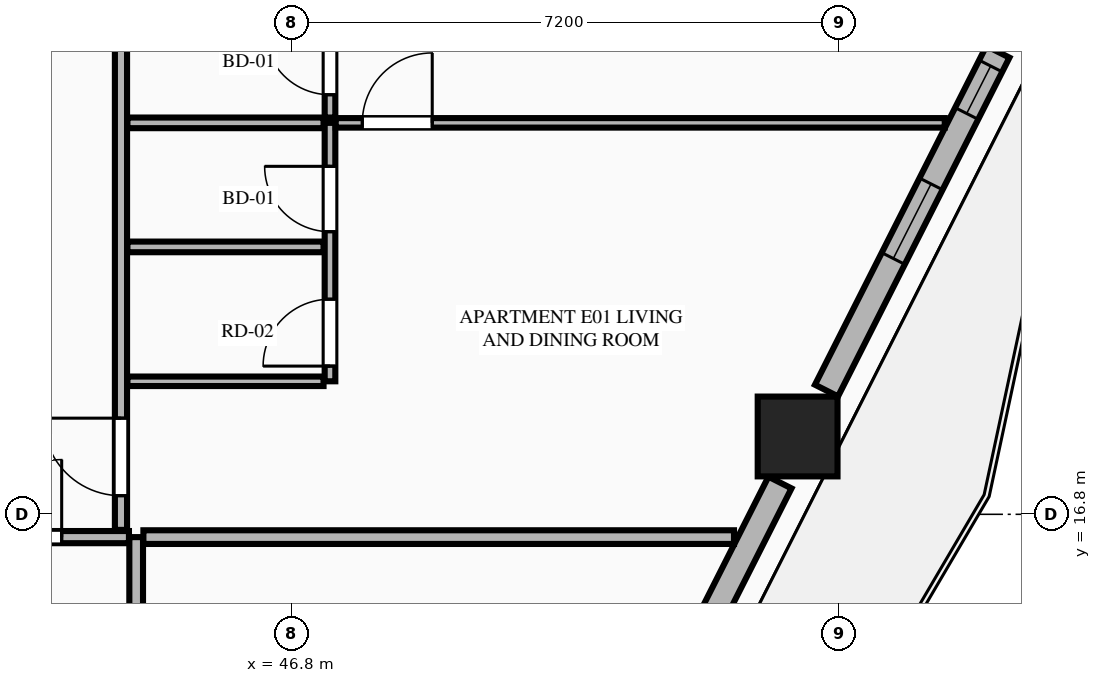
"""IFC4 building model, lengths in metres.
Left out: names, types, materials, properties, quantities, classifications, styles, units other than length and angle.
Written with IfcOpenShell. Run it as: python <this file> out.ifc"""

import sys

from ifc_helpers import new_model, si_unit, direction, frame, frame_2d, origin, origin_2d, place, context, subcontext, project, spatial, rectangle, extrude, element, fill, save


model = new_model("IFC4")
c1 = context("Model", 3, precision=1e-05, world=origin(), true_north=direction((0.0, 1.0)))
c2 = subcontext(c1, "Body", "Model", "MODEL_VIEW")
j1 = project(units=[si_unit("LENGTHUNIT", "METRE"), si_unit("PLANEANGLEUNIT", "RADIAN")], contexts=[c1])
p1 = place(None, origin())
s1 = spatial("IfcSite", under=j1, at=p1, CompositionType="ELEMENT")
p2 = place(p1, origin())
s2 = spatial("IfcBuilding", under=s1, at=p2, CompositionType="ELEMENT")
p3 = place(p2, frame((0.0, 0.0, 137.45)))
s3 = spatial("IfcBuildingStorey", under=s2, at=p3, CompositionType="ELEMENT", Elevation=137.45)
p4 = place(p3, frame((53.452, 17.824, 0.0), z_axis=(0.0, 0.0, 1.0), x_axis=(1.0, 0.0, 0.0)))
e1 = element("IfcColumn", 1, at=p4, inside=s3, PredefinedType="COLUMN", context=c2, shape_type="SweptSolid", body=[
    extrude(rectangle(XDim=1.05, YDim=1.05, at=origin_2d()), origin(), (0.0, 0.0, 1.0), 3.55),
])
p5 = place(p3, frame((50.863, 12.561, 0.0), z_axis=(0.0, 0.0, 1.0), x_axis=(0.451567731634, 0.892236842855, 0.0)))
e2 = element("IfcWall", 2, at=p5, inside=s3, PredefinedType="STANDARD", context=c2, shape_type="SweptSolid", body=[
    extrude(rectangle(XDim=5.219, YDim=0.34, at=frame_2d((2.61, 0.0))), origin(), (0.0, 0.0, 1.0), 2.797),
])
p6 = place(p5, frame((1.532, 0.0, 0.0)))
e3 = element("IfcOpeningElement", 3, at=p6, cuts=e2, PredefinedType="OPENING", context=c2, shape_type="SweptSolid", body=[
    extrude(rectangle(XDim=1.1, YDim=2.25, at=frame_2d((0.55, 1.125))), frame((0.0, 0.18, 0.0), z_axis=(0.0, -1.0, 0.0), x_axis=(1.0, 0.0, 0.0)), (0.0, 0.0, 1.0), 0.36),
])
p7 = place(p3, frame((53.832, 18.428, 0.0), z_axis=(0.0, 0.0, 1.0), x_axis=(0.451431617681, 0.892305718102, 0.0)))
e4 = element("IfcWall", 4, at=p7, inside=s3, PredefinedType="STANDARD", context=c2, shape_type="SweptSolid", body=[
    extrude(rectangle(XDim=4.995, YDim=0.34, at=frame_2d((2.498, 0.0))), origin(), (0.0, 0.0, 1.0), 2.797),
])
p8 = place(p7, frame((1.947, 0.0, 0.75)))
e5 = element("IfcOpeningElement", 5, at=p8, cuts=e4, PredefinedType="OPENING", context=c2, shape_type="SweptSolid", body=[
    extrude(rectangle(XDim=1.1, YDim=1.897, at=frame_2d((0.55, 0.948))), frame((0.0, 0.18, 0.0), z_axis=(0.0, -1.0, 0.0), x_axis=(1.0, 0.0, 0.0)), (0.0, 0.0, 1.0), 0.36),
])
p9 = place(p7, frame((4.085, 0.0, 0.75)))
e6 = element("IfcOpeningElement", 6, at=p9, cuts=e4, PredefinedType="OPENING", context=c2, shape_type="SweptSolid", body=[
    extrude(rectangle(XDim=0.7, YDim=1.897, at=frame_2d((0.35, 0.948))), frame((0.0, 0.18, 0.0), z_axis=(0.0, -1.0, 0.0), x_axis=(1.0, 0.0, 0.0)), (0.0, 0.0, 1.0), 0.36),
])
p10 = place(p3, frame((44.75, 4.105, 0.0), z_axis=(0.0, 0.0, 1.0), x_axis=(0.0, 1.0, 0.0)))
e7 = element("IfcWall", 7, at=p10, inside=s3, PredefinedType="PARTITIONING", context=c2, shape_type="SweptSolid", body=[
    extrude(rectangle(XDim=12.395, YDim=0.18, at=frame_2d((6.198, 0.0))), origin(), (0.0, 0.0, 1.0), 3.34),
])
p11 = place(p3, frame((28.663, 16.5, 0.0), z_axis=(0.0, 0.0, 1.0), x_axis=(1.0, 0.0, 0.0)))
e8 = element("IfcWall", 8, at=p11, inside=s3, PredefinedType="PARTITIONING", context=c2, shape_type="SweptSolid", body=[
    extrude(rectangle(XDim=15.992, YDim=0.16, at=frame_2d((7.996, 0.0))), origin(), (0.0, 0.0, 1.0), 3.34),
])
p12 = place(p11, frame((14.087, 0.0, 0.0)))
e9 = element("IfcOpeningElement", 9, at=p12, cuts=e8, PredefinedType="OPENING", context=c2, shape_type="SweptSolid", body=[
    extrude(rectangle(XDim=1.02, YDim=2.25, at=frame_2d((0.51, 1.125))), frame((0.0, 0.09, 0.0), z_axis=(0.0, -1.0, 0.0), x_axis=(1.0, 0.0, 0.0)), (0.0, 0.0, 1.0), 0.18),
])
p13 = place(p3, frame((44.845, 16.5, 0.0), z_axis=(0.0, 0.0, 1.0), x_axis=(1.0, 0.0, 0.0)))
e10 = element("IfcWall", 10, at=p13, inside=s3, PredefinedType="PARTITIONING", context=c2, shape_type="SweptSolid", body=[
    extrude(rectangle(XDim=7.77, YDim=0.18, at=frame_2d((3.885, 0.0))), origin(), (0.0, 0.0, 1.0), 3.34),
])
p14 = place(p3, frame((44.55, 16.595, 0.0), z_axis=(0.0, 0.0, 1.0), x_axis=(0.0, 1.0, 0.0)))
e11 = element("IfcWall", 11, at=p14, inside=s3, PredefinedType="PARTITIONING", context=c2, shape_type="SweptSolid", body=[
    extrude(rectangle(XDim=9.21, YDim=0.16, at=frame_2d((4.605, 0.0))), origin(), (0.0, 0.0, 1.0), 3.34),
])
p15 = place(p14, frame((0.45, 0.0, 0.0)))
e12 = element("IfcOpeningElement", 12, at=p15, cuts=e11, PredefinedType="OPENING", context=c2, shape_type="SweptSolid", body=[
    extrude(rectangle(XDim=1.02, YDim=2.25, at=frame_2d((0.51, 1.125))), frame((0.0, 0.09, 0.0), z_axis=(0.0, -1.0, 0.0), x_axis=(1.0, 0.0, 0.0)), (0.0, 0.0, 1.0), 0.18),
])
p16 = place(p3, frame((44.635, 18.55, 0.0), z_axis=(0.0, 0.0, 1.0), x_axis=(1.0, 0.0, 0.0)))
e13 = element("IfcWall", 13, at=p16, inside=s3, PredefinedType="PARTITIONING", context=c2, shape_type="SweptSolid", body=[
    extrude(rectangle(XDim=2.58, YDim=0.125, at=frame_2d((1.29, 0.0))), origin(), (0.0, 0.0, 1.0), 2.722),
])
p17 = place(p3, frame((47.3, 18.55, 0.0), z_axis=(0.0, 0.0, 1.0), x_axis=(0.0, 1.0, 0.0)))
e14 = element("IfcWall", 14, at=p17, inside=s3, PredefinedType="PLUMBINGWALL", context=c2, shape_type="SweptSolid", body=[
    extrude(rectangle(XDim=3.4, YDim=0.14, at=frame_2d((1.7, 0.0))), origin(), (0.0, 0.0, 1.0), 3.34),
])
p18 = place(p17, frame((0.2, 0.0, 0.0)))
e15 = element("IfcOpeningElement", 15, at=p18, cuts=e14, PredefinedType="OPENING", context=c2, shape_type="SweptSolid", body=[
    extrude(rectangle(XDim=0.88, YDim=2.15, at=frame_2d((0.44, 1.075))), frame((0.0, 0.08, 0.0), z_axis=(0.0, -1.0, 0.0), x_axis=(1.0, 0.0, 0.0)), (0.0, 0.0, 1.0), 0.16),
])
p19 = place(p17, frame((1.968, 0.0, 0.0)))
e16 = element("IfcOpeningElement", 16, at=p19, cuts=e14, PredefinedType="OPENING", context=c2, shape_type="SweptSolid", body=[
    extrude(rectangle(XDim=0.86, YDim=2.1, at=frame_2d((0.43, 1.05))), frame((0.0, 0.08, 0.0), z_axis=(0.0, -1.0, 0.0), x_axis=(1.0, 0.0, 0.0)), (0.0, 0.0, 1.0), 0.16),
])
p20 = place(p3, frame((47.3, 22.02, 0.0), z_axis=(0.0, 0.0, 1.0), x_axis=(0.0, 1.0, 0.0)))
e17 = element("IfcWall", 17, at=p20, inside=s3, PredefinedType="PLUMBINGWALL", context=c2, shape_type="SweptSolid", body=[
    extrude(rectangle(XDim=3.785, YDim=0.14, at=frame_2d((1.893, 0.0))), origin(), (0.0, 0.0, 1.0), 3.34),
])
p21 = place(p20, frame((0.3, 0.0, 0.0)))
e18 = element("IfcOpeningElement", 18, at=p21, cuts=e17, PredefinedType="OPENING", context=c2, shape_type="SweptSolid", body=[
    extrude(rectangle(XDim=0.86, YDim=2.1, at=frame_2d((0.43, 1.05))), frame((0.0, 0.08, 0.0), z_axis=(0.0, -1.0, 0.0), x_axis=(1.0, 0.0, 0.0)), (0.0, 0.0, 1.0), 0.16),
])
p22 = place(p3, frame((44.635, 21.95, 0.0), z_axis=(0.0, 0.0, 1.0), x_axis=(1.0, 0.0, 0.0)))
e19 = element("IfcWall", 19, at=p22, inside=s3, PredefinedType="PLUMBINGWALL", context=c2, shape_type="SweptSolid", body=[
    extrude(rectangle(XDim=2.58, YDim=0.14, at=frame_2d((1.29, 0.0))), origin(), (0.0, 0.0, 1.0), 3.34),
])
p23 = place(p3, frame((47.375, 21.95, 0.0), z_axis=(0.0, 0.0, 1.0), x_axis=(1.0, 0.0, 0.0)))
e20 = element("IfcWall", 20, at=p23, inside=s3, PredefinedType="PARTITIONING", context=c2, shape_type="SweptSolid", body=[
    extrude(rectangle(XDim=8.013, YDim=0.125, at=frame_2d((4.006, 0.0))), origin(), (0.0, 0.0, 1.0), 3.34),
])
p24 = place(p23, frame((0.35, 0.0, 0.0)))
e21 = element("IfcOpeningElement", 21, at=p24, cuts=e20, PredefinedType="OPENING", context=c2, shape_type="SweptSolid", body=[
    extrude(rectangle(XDim=0.92, YDim=2.15, at=frame_2d((0.46, 1.075))), frame((0.0, 0.073, 0.0), z_axis=(0.0, -1.0, 0.0), x_axis=(1.0, 0.0, 0.0)), (0.0, 0.0, 1.0), 0.145),
])
p25 = place(p3, frame((44.635, 20.318, 0.0), z_axis=(0.0, 0.0, 1.0), x_axis=(1.0, 0.0, 0.0)))
e22 = element("IfcWall", 22, at=p25, inside=s3, PredefinedType="PLUMBINGWALL", context=c2, shape_type="SweptSolid", body=[
    extrude(rectangle(XDim=2.58, YDim=0.14, at=frame_2d((1.29, 0.0))), origin(), (0.0, 0.0, 1.0), 3.34),
])
p26 = place(p8, origin())
e23 = element("IfcWindow", 23, at=p26, inside=s3, PartitioningType="SINGLE_PANEL", PredefinedType="WINDOW", context=c2, shape_type="SweptSolid", body=[
    extrude(rectangle(XDim=1.1, YDim=1.897, at=frame_2d((0.55, 0.948))), frame((0.0, 0.03, 0.0), z_axis=(0.0, -1.0, 0.0), x_axis=(1.0, 0.0, 0.0)), (0.0, 0.0, 1.0), 0.06),
])
fill(e5, e23)
p27 = place(p12, origin())
e24 = element("IfcDoor", 24, at=p27, inside=s3, OperationType="SINGLE_SWING_RIGHT", PredefinedType="DOOR", context=c2, shape_type="SweptSolid", body=[
    extrude(rectangle(XDim=1.02, YDim=2.25, at=frame_2d((0.51, 1.125))), frame((0.0, 0.025, 0.0), z_axis=(0.0, -1.0, 0.0), x_axis=(1.0, 0.0, 0.0)), (0.0, 0.0, 1.0), 0.05),
])
fill(e9, e24)
p28 = place(p18, origin())
e25 = element("IfcDoor", 25, at=p28, inside=s3, OperationType="SINGLE_SWING_LEFT", PredefinedType="DOOR", context=c2, shape_type="SweptSolid", body=[
    extrude(rectangle(XDim=0.88, YDim=2.15, at=frame_2d((0.44, 1.075))), frame((0.0, 0.025, 0.0), z_axis=(0.0, -1.0, 0.0), x_axis=(1.0, 0.0, 0.0)), (0.0, 0.0, 1.0), 0.05),
])
fill(e15, e25)
p29 = place(p19, origin())
e26 = element("IfcDoor", 26, at=p29, inside=s3, OperationType="SINGLE_SWING_RIGHT", PredefinedType="DOOR", context=c2, shape_type="SweptSolid", body=[
    extrude(rectangle(XDim=0.86, YDim=2.1, at=frame_2d((0.43, 1.05))), frame((0.0, 0.025, 0.0), z_axis=(0.0, -1.0, 0.0), x_axis=(1.0, 0.0, 0.0)), (0.0, 0.0, 1.0), 0.05),
])
fill(e16, e26)
p30 = place(p21, origin())
e27 = element("IfcDoor", 27, at=p30, inside=s3, OperationType="SINGLE_SWING_RIGHT", PredefinedType="DOOR", context=c2, shape_type="SweptSolid", body=[
    extrude(rectangle(XDim=0.86, YDim=2.1, at=frame_2d((0.43, 1.05))), frame((0.0, 0.025, 0.0), z_axis=(0.0, -1.0, 0.0), x_axis=(1.0, 0.0, 0.0)), (0.0, 0.0, 1.0), 0.05),
])
fill(e18, e27)
p31 = place(p15, origin())
e28 = element("IfcDoor", 28, at=p31, inside=s3, OperationType="SINGLE_SWING_RIGHT", PredefinedType="DOOR", context=c2, shape_type="SweptSolid", body=[
    extrude(rectangle(XDim=1.02, YDim=2.25, at=frame_2d((0.51, 1.125))), frame((0.0, 0.025, 0.0), z_axis=(0.0, -1.0, 0.0), x_axis=(1.0, 0.0, 0.0)), (0.0, 0.0, 1.0), 0.05),
])
fill(e12, e28)
p32 = place(p24, origin())
e29 = element("IfcDoor", 29, at=p32, inside=s3, OperationType="SINGLE_SWING_RIGHT", PredefinedType="DOOR", context=c2, shape_type="SweptSolid", body=[
    extrude(rectangle(XDim=0.92, YDim=2.15, at=frame_2d((0.46, 1.075))), frame((0.0, 0.025, 0.0), z_axis=(0.0, -1.0, 0.0), x_axis=(1.0, 0.0, 0.0)), (0.0, 0.0, 1.0), 0.05),
])
fill(e21, e29)
p33 = place(p9, origin())
e30 = element("IfcWindow", 30, at=p33, inside=s3, PartitioningType="SINGLE_PANEL", PredefinedType="WINDOW", context=c2, shape_type="SweptSolid", body=[
    extrude(rectangle(XDim=0.7, YDim=1.897, at=frame_2d((0.35, 0.948))), frame((0.0, 0.03, 0.0), z_axis=(0.0, -1.0, 0.0), x_axis=(1.0, 0.0, 0.0)), (0.0, 0.0, 1.0), 0.06),
])
fill(e6, e30)
save(model, sys.argv[1])
